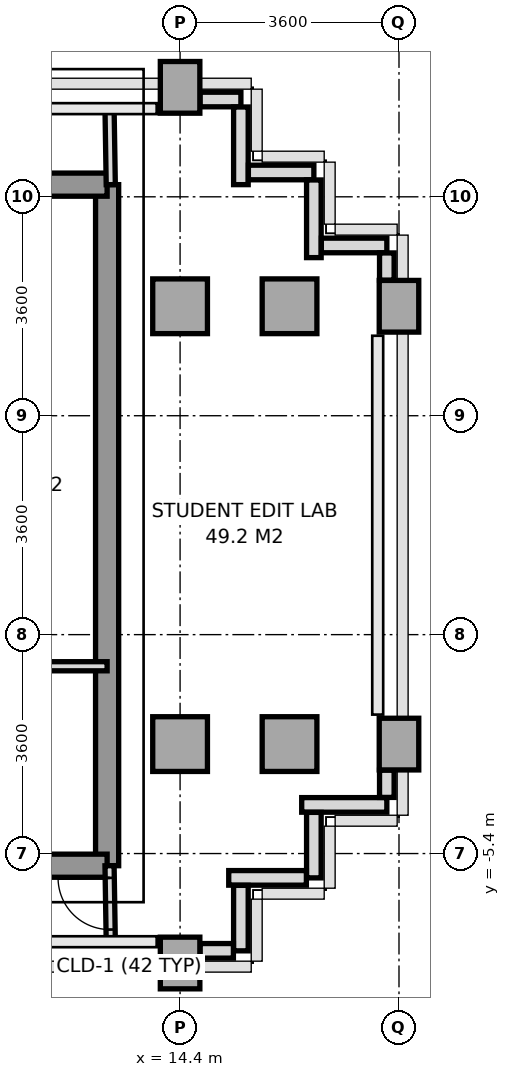
"""IFC4 building model, lengths in metres.
Left out: names, types, materials, properties, quantities, classifications, styles, units other than length and angle.
Written with IfcOpenShell. Run it as: python <this file> out.ifc"""

import sys

from ifc_helpers import new_model, si_unit, direction, frame, frame_2d, origin, origin_2d, place, context, subcontext, project, spatial, rectangle, extrude, source, transform, mapped, element, fill, save


model = new_model("IFC4")
c1 = context("Model", 3, precision=1e-05, world=origin(), true_north=direction((0.0, 1.0)))
c2 = subcontext(c1, "Body", "Model", "MODEL_VIEW")
j1 = project(units=[si_unit("LENGTHUNIT", "METRE"), si_unit("PLANEANGLEUNIT", "RADIAN")], contexts=[c1])
p1 = place(None, origin())
s1 = spatial("IfcSite", under=j1, at=p1, CompositionType="ELEMENT")
p2 = place(p1, origin())
s2 = spatial("IfcBuilding", under=s1, at=p2, CompositionType="ELEMENT")
p3 = place(p2, frame((0.0, 0.0, 174.0)))
s3 = spatial("IfcBuildingStorey", under=s2, at=p3, CompositionType="ELEMENT", Elevation=174.0)
m1 = source(origin(), c2, "Body", "SweptSolid", [
    extrude(rectangle(XDim=0.65, YDim=0.85, at=origin_2d()), origin(), (0.0, 0.0, 1.0), 3.2),
])
p4 = place(p3, frame((14.4, -7.2, 0.0), z_axis=(0.0, 0.0, 1.0), x_axis=(1.0, 0.0, 0.0)))
e1 = element("IfcColumn", 1, at=p4, inside=s3, PredefinedType="COLUMN", context=c2, shape_type="MappedRepresentation", body=[
    mapped(m1, transform((0.0, 0.0, 0.0), x_axis=(1.0, 0.0, 0.0), y_axis=(0.0, 1.0, 0.0), z_axis=(0.0, 0.0, 1.0), scale=1.0)),
])
m2 = source(origin(), c2, "Body", "SweptSolid", [
    extrude(rectangle(XDim=0.9, YDim=0.9, at=origin_2d()), origin(), (0.0, 0.0, 1.0), 3.2),
])
for number, where, z_axis, x_axis in (
    (2, (14.4, -3.6, 0.0), (0.0, 0.0, 1.0), (1.0, 0.0, 0.0)),
    (3, (14.4, 3.6, 0.0), (0.0, 0.0, 1.0), (1.0, 0.0, 0.0)),
):
    element("IfcColumn", number, at=place(p3, frame(where, z_axis=z_axis, x_axis=x_axis)), inside=s3, PredefinedType="COLUMN", context=c2, shape_type="MappedRepresentation", body=[
        mapped(m2, transform((0.0, 0.0, 0.0), x_axis=(1.0, 0.0, 0.0), y_axis=(0.0, 1.0, 0.0), z_axis=(0.0, 0.0, 1.0), scale=1.0)),
    ])
p5 = place(p3, frame((14.4, 7.2, 0.0), z_axis=(0.0, 0.0, 1.0), x_axis=(1.0, 0.0, 0.0)))
e4 = element("IfcColumn", 4, at=p5, inside=s3, PredefinedType="COLUMN", context=c2, shape_type="MappedRepresentation", body=[
    mapped(m1, transform((0.0, 0.0, 0.0), x_axis=(1.0, 0.0, 0.0), y_axis=(0.0, 1.0, 0.0), z_axis=(0.0, 0.0, 1.0), scale=1.0)),
])
for number, where, z_axis, x_axis in (
    (5, (16.2, -3.6, 0.0), (0.0, 0.0, 1.0), (1.0, 0.0, 0.0)),
    (6, (16.2, 3.6, 0.0), (0.0, 0.0, 1.0), (1.0, 0.0, 0.0)),
):
    element("IfcColumn", number, at=place(p3, frame(where, z_axis=z_axis, x_axis=x_axis)), inside=s3, PredefinedType="COLUMN", context=c2, shape_type="MappedRepresentation", body=[
        mapped(m2, transform((0.0, 0.0, 0.0), x_axis=(1.0, 0.0, 0.0), y_axis=(0.0, 1.0, 0.0), z_axis=(0.0, 0.0, 1.0), scale=1.0)),
    ])
for number, where, z_axis, x_axis in (
    (7, (18.0, -3.6, 0.0), (0.0, 0.0, 1.0), (1.0, 0.0, 0.0)),
    (8, (18.0, 3.6, 0.0), (0.0, 0.0, 1.0), (1.0, 0.0, 0.0)),
):
    element("IfcColumn", number, at=place(p3, frame(where, z_axis=z_axis, x_axis=x_axis)), inside=s3, PredefinedType="COLUMN", context=c2, shape_type="MappedRepresentation", body=[
        mapped(m1, transform((0.0, 0.0, 0.0), x_axis=(1.0, 0.0, 0.0), y_axis=(0.0, 1.0, 0.0), z_axis=(0.0, 0.0, 1.0), scale=1.0)),
    ])
p6 = place(p3, frame((17.8, -4.6, 0.0), z_axis=(0.0, 0.0, 1.0), x_axis=(-1.0, 0.0, 0.0)))
e9 = element("IfcWall", 9, at=p6, inside=s3, PredefinedType="PARAPET", context=c2, shape_type="SweptSolid", body=[
    extrude(rectangle(XDim=1.4, YDim=0.24, at=frame_2d((0.7, 0.0))), origin(), (0.0, 0.0, 1.0), 1.15),
])
p7 = place(p3, frame((16.6, -4.723, 0.0), z_axis=(0.0, 0.0, 1.0), x_axis=(0.0, -1.0, 0.0)))
e10 = element("IfcWall", 10, at=p7, inside=s3, PredefinedType="PARAPET", context=c2, shape_type="SweptSolid", body=[
    extrude(rectangle(XDim=1.077, YDim=0.24, at=frame_2d((0.539, 0.0))), origin(), (0.0, 0.0, 1.0), 1.15),
])
p8 = place(p3, frame((16.477, -5.8, 0.0), z_axis=(0.0, 0.0, 1.0), x_axis=(-1.0, 0.0, 0.0)))
e11 = element("IfcWall", 11, at=p8, inside=s3, PredefinedType="PARAPET", context=c2, shape_type="SweptSolid", body=[
    extrude(rectangle(XDim=1.277, YDim=0.24, at=frame_2d((0.639, 0.0))), origin(), (0.0, 0.0, 1.0), 1.15),
])
p9 = place(p3, frame((15.4, -5.923, 0.0), z_axis=(0.0, 0.0, 1.0), x_axis=(0.0, -1.0, 0.0)))
e12 = element("IfcWall", 12, at=p9, inside=s3, PredefinedType="PARAPET", context=c2, shape_type="SweptSolid", body=[
    extrude(rectangle(XDim=1.077, YDim=0.24, at=frame_2d((0.539, 0.0))), origin(), (0.0, 0.0, 1.0), 1.15),
])
p10 = place(p3, frame((15.277, -7.0, 0.0), z_axis=(0.0, 0.0, 1.0), x_axis=(-1.0, 0.0, 0.0)))
e13 = element("IfcWall", 13, at=p10, inside=s3, PredefinedType="PARAPET", context=c2, shape_type="SweptSolid", body=[
    extrude(rectangle(XDim=0.549, YDim=0.24, at=frame_2d((0.274, 0.0))), origin(), (0.0, 0.0, 1.0), 1.15),
])
p11 = place(p3, frame((14.728, 7.0, 0.0), z_axis=(0.0, 0.0, 1.0), x_axis=(1.0, 0.0, 0.0)))
e14 = element("IfcWall", 14, at=p11, inside=s3, PredefinedType="PARAPET", context=c2, shape_type="SweptSolid", body=[
    extrude(rectangle(XDim=0.672, YDim=0.24, at=frame_2d((0.336, 0.0))), origin(), (0.0, 0.0, 1.0), 1.15),
])
p12 = place(p3, frame((15.4, 6.877, 0.0), z_axis=(0.0, 0.0, 1.0), x_axis=(0.0, -1.0, 0.0)))
e15 = element("IfcWall", 15, at=p12, inside=s3, PredefinedType="PARAPET", context=c2, shape_type="SweptSolid", body=[
    extrude(rectangle(XDim=1.277, YDim=0.24, at=frame_2d((0.638, 0.0))), origin(), (0.0, 0.0, 1.0), 1.15),
])
p13 = place(p3, frame((15.523, 5.8, 0.0), z_axis=(0.0, 0.0, 1.0), x_axis=(1.0, 0.0, 0.0)))
e16 = element("IfcWall", 16, at=p13, inside=s3, PredefinedType="PARAPET", context=c2, shape_type="SweptSolid", body=[
    extrude(rectangle(XDim=1.077, YDim=0.24, at=frame_2d((0.539, 0.0))), origin(), (0.0, 0.0, 1.0), 1.15),
])
p14 = place(p3, frame((16.6, 5.677, 0.0), z_axis=(0.0, 0.0, 1.0), x_axis=(0.0, -1.0, 0.0)))
e17 = element("IfcWall", 17, at=p14, inside=s3, PredefinedType="PARAPET", context=c2, shape_type="SweptSolid", body=[
    extrude(rectangle(XDim=1.277, YDim=0.24, at=frame_2d((0.639, 0.0))), origin(), (0.0, 0.0, 1.0), 1.15),
])
p15 = place(p3, frame((16.723, 4.6, 0.0), z_axis=(0.0, 0.0, 1.0), x_axis=(1.0, 0.0, 0.0)))
e18 = element("IfcWall", 18, at=p15, inside=s3, PredefinedType="PARAPET", context=c2, shape_type="SweptSolid", body=[
    extrude(rectangle(XDim=1.077, YDim=0.24, at=frame_2d((0.539, 0.0))), origin(), (0.0, 0.0, 1.0), 1.15),
])
for number, where, z_axis, x_axis in (
    (19, (17.8, 4.477, 0.0), (0.0, 0.0, 1.0), (0.0, -1.0, 0.0)),
    (20, (17.8, -4.028, 0.0), (0.0, 0.0, 1.0), (0.0, -1.0, 0.0)),
):
    element("IfcWall", number, at=place(p3, frame(where, z_axis=z_axis, x_axis=x_axis)), inside=s3, PredefinedType="PARAPET", context=c2, shape_type="SweptSolid", body=[
        extrude(rectangle(XDim=0.449, YDim=0.24, at=frame_2d((0.225, 0.0))), origin(), (0.0, 0.0, 1.0), 1.15),
    ])
p16 = place(p3, frame((13.2, -5.6, 0.0), z_axis=(0.0, 0.0, 1.0), x_axis=(0.0, 1.0, 0.0)))
e21 = element("IfcWall", 21, at=p16, inside=s3, PredefinedType="SHEAR", context=c2, shape_type="SweptSolid", body=[
    extrude(rectangle(XDim=11.2, YDim=0.38, at=frame_2d((5.6, 0.0))), origin(), (0.0, 0.0, 1.0), 3.2),
])
p17 = place(p3, frame((11.356, 5.6, 0.0), z_axis=(0.0, 0.0, 1.0), x_axis=(1.0, 0.0, 0.0)))
e22 = element("IfcWall", 22, at=p17, inside=s3, PredefinedType="SHEAR", context=c2, shape_type="SweptSolid", body=[
    extrude(rectangle(XDim=1.844, YDim=0.38, at=frame_2d((0.922, 0.0))), origin(), (0.0, 0.0, 1.0), 3.2),
])
p18 = place(p3, frame((5.4, -5.6, 0.0), z_axis=(0.0, 0.0, 1.0), x_axis=(1.0, 0.0, 0.0)))
e23 = element("IfcWall", 23, at=p18, inside=s3, PredefinedType="SHEAR", context=c2, shape_type="SweptSolid", body=[
    extrude(rectangle(XDim=7.8, YDim=0.38, at=frame_2d((3.9, 0.0))), origin(), (0.0, 0.0, 1.0), 3.2),
])
p19 = place(p18, frame((3.0, 0.0, 0.0)))
e24 = element("IfcOpeningElement", 24, at=p19, cuts=e23, PredefinedType="OPENING", context=c2, shape_type="SweptSolid", body=[
    extrude(rectangle(XDim=1.2, YDim=2.2, at=frame_2d((0.6, 1.1))), frame((0.0, 0.2, 0.0), z_axis=(0.0, -1.0, 0.0), x_axis=(1.0, 0.0, 0.0)), (0.0, 0.0, 1.0), 0.4),
])
p20 = place(p18, frame((5.85, 0.0, 0.0)))
e25 = element("IfcOpeningElement", 25, at=p20, cuts=e23, PredefinedType="OPENING", context=c2, shape_type="SweptSolid", body=[
    extrude(rectangle(XDim=0.8, YDim=2.1, at=frame_2d((0.4, 1.05))), frame((0.0, 0.2, 0.0), z_axis=(0.0, -1.0, 0.0), x_axis=(1.0, 0.0, 0.0)), (0.0, 0.0, 1.0), 0.4),
])
p21 = place(p3, frame((11.02, -2.32, 0.0), z_axis=(0.0, 0.0, 1.0), x_axis=(1.0, 0.0, 0.0)))
e26 = element("IfcWall", 26, at=p21, inside=s3, PredefinedType="PARTITIONING", context=c2, shape_type="SweptSolid", body=[
    extrude(rectangle(XDim=2.18, YDim=0.15, at=frame_2d((1.09, 0.0))), origin(), (0.0, 0.0, 1.0), 3.2),
])
p22 = place(p3, frame((13.26, 5.6, 0.0), z_axis=(0.0, 0.0, 1.0), x_axis=(-0.016013571389, 0.999871774545, 0.0)))
e27 = element("IfcWall", 27, at=p22, inside=s3, PredefinedType="PARTITIONING", context=c2, shape_type="SweptSolid", body=[
    extrude(rectangle(XDim=1.25, YDim=0.15, at=frame_2d((0.625, 0.0))), origin(), (0.0, 0.0, 1.0), 3.2),
])
p23 = place(p3, frame((13.26, -6.85, 0.0), z_axis=(0.0, 0.0, 1.0), x_axis=(-0.016013571389, 0.999871774545, 0.0)))
e28 = element("IfcWall", 28, at=p23, inside=s3, PredefinedType="PARTITIONING", context=c2, shape_type="SweptSolid", body=[
    extrude(rectangle(XDim=1.25, YDim=0.15, at=frame_2d((0.625, 0.0))), origin(), (0.0, 0.0, 1.0), 3.2),
])
p24 = place(p23, frame((0.2, 0.0, 0.0)))
e29 = element("IfcOpeningElement", 29, at=p24, cuts=e28, PredefinedType="OPENING", context=c2, shape_type="SweptSolid", body=[
    extrude(rectangle(XDim=0.85, YDim=2.1, at=frame_2d((0.425, 1.05))), frame((0.0, 0.085, 0.0), z_axis=(0.0, -1.0, 0.0), x_axis=(1.0, 0.0, 0.0)), (0.0, 0.0, 1.0), 0.17),
])
m3 = source(origin(), c2, "Body", "SweptSolid", [
    extrude(rectangle(XDim=0.85, YDim=2.1, at=frame_2d((0.425, 1.05))), frame((0.0, 0.025, 0.0), z_axis=(0.0, -1.0, 0.0), x_axis=(1.0, 0.0, 0.0)), (0.0, 0.0, 1.0), 0.05),
])
p25 = place(p24, origin())
e30 = element("IfcDoor", 30, at=p25, inside=s3, OperationType="SINGLE_SWING_RIGHT", PredefinedType="DOOR", context=c2, shape_type="MappedRepresentation", body=[
    mapped(m3, transform((0.0, 0.0, 0.0), x_axis=(1.0, 0.0, 0.0), y_axis=(0.0, 1.0, 0.0), z_axis=(0.0, 0.0, 1.0), scale=1.0)),
])
fill(e29, e30)
save(model, sys.argv[1])
